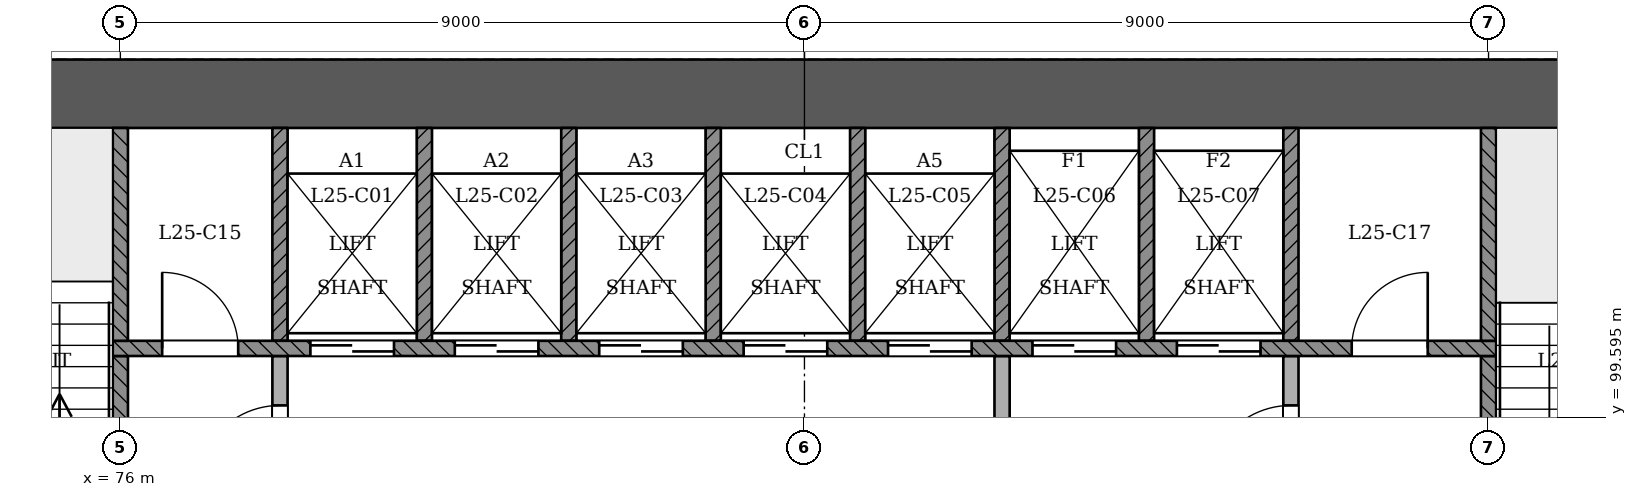
"""IFC4 building model, lengths in metres.
Left out: names, types, materials, properties, quantities, classifications, styles, units other than length and angle.
Written with IfcOpenShell. Run it as: python <this file> out.ifc"""

import sys

from ifc_helpers import new_model, si_unit, direction, frame, frame_2d, origin, place, context, subcontext, project, spatial, rectangle, extrude, element, fill, save


model = new_model("IFC4")
c1 = context("Model", 3, precision=1e-05, world=origin(), true_north=direction((0.0, 1.0)))
c2 = subcontext(c1, "Body", "Model", "MODEL_VIEW")
j1 = project(units=[si_unit("LENGTHUNIT", "METRE"), si_unit("PLANEANGLEUNIT", "RADIAN")], contexts=[c1])
p1 = place(None, origin())
s1 = spatial("IfcSite", under=j1, at=p1, CompositionType="ELEMENT")
p2 = place(p1, origin())
s2 = spatial("IfcBuilding", under=s1, at=p2, CompositionType="ELEMENT")
p3 = place(p2, frame((0.0, 0.0, 100.8)))
s3 = spatial("IfcBuildingStorey", under=s2, at=p3, CompositionType="ELEMENT", Elevation=100.8)
p4 = place(p3, frame((97.45, 103.85, 0.0), z_axis=(0.0, 0.0, 1.0), x_axis=(-1.0, 0.0, 0.0)))
e1 = element("IfcWall", 1, at=p4, inside=s3, PredefinedType="SHEAR", context=c2, shape_type="SweptSolid", body=[
    extrude(rectangle(XDim=25.35, YDim=0.9, at=frame_2d((12.675, 0.0))), origin(), (0.0, 0.0, 1.0), 3.6),
])
p5 = place(p3, frame((87.6, 93.4, 0.0), z_axis=(0.0, 0.0, 1.0), x_axis=(0.0, 1.0, 0.0)))
e2 = element("IfcWall", 2, at=p5, inside=s3, PredefinedType="PARTITIONING", context=c2, shape_type="SweptSolid", body=[
    extrude(rectangle(XDim=7.0, YDim=0.2, at=frame_2d((3.5, 0.0))), origin(), (0.0, 0.0, 1.0), 3.1),
])
p6 = place(p5, frame((4.45, 0.0, 0.0)))
e3 = element("IfcOpeningElement", 3, at=p6, cuts=e2, PredefinedType="OPENING", context=c2, shape_type="SweptSolid", body=[
    extrude(rectangle(XDim=1.1, YDim=2.1, at=frame_2d((0.55, 1.05))), frame((0.0, 0.11, 0.0), z_axis=(0.0, -1.0, 0.0), x_axis=(1.0, 0.0, 0.0)), (0.0, 0.0, 1.0), 0.221),
])
p7 = place(p3, frame((91.4, 96.2, 0.0), z_axis=(0.0, 0.0, 1.0), x_axis=(0.0, 1.0, 0.0)))
e4 = element("IfcWall", 4, at=p7, inside=s3, PredefinedType="PARTITIONING", context=c2, shape_type="SweptSolid", body=[
    extrude(rectangle(XDim=4.2, YDim=0.2, at=frame_2d((2.1, 0.0))), origin(), (0.0, 0.0, 1.0), 3.1),
])
p8 = place(p7, frame((2.45, 0.0, 0.0)))
e5 = element("IfcOpeningElement", 5, at=p8, cuts=e4, PredefinedType="OPENING", context=c2, shape_type="SweptSolid", body=[
    extrude(rectangle(XDim=1.1, YDim=2.1, at=frame_2d((0.55, 1.05))), frame((0.0, 0.11, 0.0), z_axis=(0.0, -1.0, 0.0), x_axis=(1.0, 0.0, 0.0)), (0.0, 0.0, 1.0), 0.221),
])
p9 = place(p3, frame((76.0, 96.7, 0.0), z_axis=(0.0, 0.0, 1.0), x_axis=(0.0, 1.0, 0.0)))
e6 = element("IfcWall", 6, at=p9, inside=s3, PredefinedType="SOLIDWALL", context=c2, shape_type="SweptSolid", body=[
    extrude(rectangle(XDim=3.7, YDim=0.2, at=frame_2d((1.85, 0.0))), origin(), (0.0, 0.0, 1.0), 3.1),
])
p10 = place(p9, frame((0.35, 0.0, 0.0)))
e7 = element("IfcOpeningElement", 7, at=p10, cuts=e6, PredefinedType="OPENING", context=c2, shape_type="SweptSolid", body=[
    extrude(rectangle(XDim=1.1, YDim=2.1, at=frame_2d((0.55, 1.05))), frame((0.0, 0.11, 0.0), z_axis=(0.0, -1.0, 0.0), x_axis=(1.0, 0.0, 0.0)), (0.0, 0.0, 1.0), 0.221),
])
p11 = place(p3, frame((78.1, 96.7, 0.0), z_axis=(0.0, 0.0, 1.0), x_axis=(0.0, 1.0, 0.0)))
e8 = element("IfcWall", 8, at=p11, inside=s3, PredefinedType="PARTITIONING", context=c2, shape_type="SweptSolid", body=[
    extrude(rectangle(XDim=3.7, YDim=0.2, at=frame_2d((1.85, 0.0))), origin(), (0.0, 0.0, 1.0), 3.1),
])
p12 = place(p11, frame((1.95, 0.0, 0.0)))
e9 = element("IfcOpeningElement", 9, at=p12, cuts=e8, PredefinedType="OPENING", context=c2, shape_type="SweptSolid", body=[
    extrude(rectangle(XDim=1.1, YDim=2.1, at=frame_2d((0.55, 1.05))), frame((0.0, 0.11, 0.0), z_axis=(0.0, -1.0, 0.0), x_axis=(1.0, 0.0, 0.0)), (0.0, 0.0, 1.0), 0.221),
])
p13 = place(p3, frame((94.0, 96.7, 0.0), z_axis=(0.0, 0.0, 1.0), x_axis=(0.0, 1.0, 0.0)))
e10 = element("IfcWall", 10, at=p13, inside=s3, PredefinedType="SOLIDWALL", context=c2, shape_type="SweptSolid", body=[
    extrude(rectangle(XDim=3.7, YDim=0.2, at=frame_2d((1.85, 0.0))), origin(), (0.0, 0.0, 1.0), 3.1),
])
p14 = place(p13, frame((0.35, 0.0, 0.0)))
e11 = element("IfcOpeningElement", 11, at=p14, cuts=e10, PredefinedType="OPENING", context=c2, shape_type="SweptSolid", body=[
    extrude(rectangle(XDim=1.1, YDim=2.1, at=frame_2d((0.55, 1.05))), frame((0.0, 0.11, 0.0), z_axis=(0.0, -1.0, 0.0), x_axis=(1.0, 0.0, 0.0)), (0.0, 0.0, 1.0), 0.221),
])
p15 = place(p3, frame((75.9, 100.5, 0.0), z_axis=(0.0, 0.0, 1.0), x_axis=(1.0, 0.0, 0.0)))
e12 = element("IfcWall", 12, at=p15, inside=s3, PredefinedType="SOLIDWALL", context=c2, shape_type="SweptSolid", body=[
    extrude(rectangle(XDim=18.2, YDim=0.2, at=frame_2d((9.1, 0.0))), origin(), (0.0, 0.0, 1.0), 3.1),
])
p16 = place(p15, frame((2.6, 0.0, 0.0)))
e13 = element("IfcOpeningElement", 13, at=p16, cuts=e12, PredefinedType="OPENING", context=c2, shape_type="SweptSolid", body=[
    extrude(rectangle(XDim=1.1, YDim=2.1, at=frame_2d((0.55, 1.05))), frame((0.0, 0.11, 0.0), z_axis=(0.0, -1.0, 0.0), x_axis=(1.0, 0.0, 0.0)), (0.0, 0.0, 1.0), 0.221),
])
p17 = place(p15, frame((4.5, 0.0, 0.0)))
e14 = element("IfcOpeningElement", 14, at=p17, cuts=e12, PredefinedType="OPENING", context=c2, shape_type="SweptSolid", body=[
    extrude(rectangle(XDim=1.1, YDim=2.1, at=frame_2d((0.55, 1.05))), frame((0.0, 0.11, 0.0), z_axis=(0.0, -1.0, 0.0), x_axis=(1.0, 0.0, 0.0)), (0.0, 0.0, 1.0), 0.221),
])
p18 = place(p15, frame((6.4, 0.0, 0.0)))
e15 = element("IfcOpeningElement", 15, at=p18, cuts=e12, PredefinedType="OPENING", context=c2, shape_type="SweptSolid", body=[
    extrude(rectangle(XDim=1.1, YDim=2.1, at=frame_2d((0.55, 1.05))), frame((0.0, 0.11, 0.0), z_axis=(0.0, -1.0, 0.0), x_axis=(1.0, 0.0, 0.0)), (0.0, 0.0, 1.0), 0.221),
])
p19 = place(p15, frame((8.3, 0.0, 0.0)))
e16 = element("IfcOpeningElement", 16, at=p19, cuts=e12, PredefinedType="OPENING", context=c2, shape_type="SweptSolid", body=[
    extrude(rectangle(XDim=1.1, YDim=2.1, at=frame_2d((0.55, 1.05))), frame((0.0, 0.11, 0.0), z_axis=(0.0, -1.0, 0.0), x_axis=(1.0, 0.0, 0.0)), (0.0, 0.0, 1.0), 0.221),
])
p20 = place(p15, frame((10.2, 0.0, 0.0)))
e17 = element("IfcOpeningElement", 17, at=p20, cuts=e12, PredefinedType="OPENING", context=c2, shape_type="SweptSolid", body=[
    extrude(rectangle(XDim=1.1, YDim=2.1, at=frame_2d((0.55, 1.05))), frame((0.0, 0.11, 0.0), z_axis=(0.0, -1.0, 0.0), x_axis=(1.0, 0.0, 0.0)), (0.0, 0.0, 1.0), 0.221),
])
p21 = place(p15, frame((12.1, 0.0, 0.0)))
e18 = element("IfcOpeningElement", 18, at=p21, cuts=e12, PredefinedType="OPENING", context=c2, shape_type="SweptSolid", body=[
    extrude(rectangle(XDim=1.1, YDim=2.1, at=frame_2d((0.55, 1.05))), frame((0.0, 0.11, 0.0), z_axis=(0.0, -1.0, 0.0), x_axis=(1.0, 0.0, 0.0)), (0.0, 0.0, 1.0), 0.221),
])
p22 = place(p15, frame((14.0, 0.0, 0.0)))
e19 = element("IfcOpeningElement", 19, at=p22, cuts=e12, PredefinedType="OPENING", context=c2, shape_type="SweptSolid", body=[
    extrude(rectangle(XDim=1.1, YDim=2.1, at=frame_2d((0.55, 1.05))), frame((0.0, 0.11, 0.0), z_axis=(0.0, -1.0, 0.0), x_axis=(1.0, 0.0, 0.0)), (0.0, 0.0, 1.0), 0.221),
])
p23 = place(p15, frame((0.65, 0.0, 0.0)))
e20 = element("IfcOpeningElement", 20, at=p23, cuts=e12, PredefinedType="OPENING", context=c2, shape_type="SweptSolid", body=[
    extrude(rectangle(XDim=1.0, YDim=2.1, at=frame_2d((0.5, 1.05))), frame((0.0, 0.11, 0.0), z_axis=(0.0, -1.0, 0.0), x_axis=(1.0, 0.0, 0.0)), (0.0, 0.0, 1.0), 0.221),
])
p24 = place(p15, frame((16.3, 0.0, 0.0)))
e21 = element("IfcOpeningElement", 21, at=p24, cuts=e12, PredefinedType="OPENING", context=c2, shape_type="SweptSolid", body=[
    extrude(rectangle(XDim=1.0, YDim=2.1, at=frame_2d((0.5, 1.05))), frame((0.0, 0.11, 0.0), z_axis=(0.0, -1.0, 0.0), x_axis=(1.0, 0.0, 0.0)), (0.0, 0.0, 1.0), 0.221),
])
for number, where, z_axis, x_axis in (
    (22, (76.0, 100.6, 0.0), (0.0, 0.0, 1.0), (0.0, 1.0, 0.0)),
    (23, (78.1, 100.6, 0.0), (0.0, 0.0, 1.0), (0.0, 1.0, 0.0)),
    (24, (80.0, 100.6, 0.0), (0.0, 0.0, 1.0), (0.0, 1.0, 0.0)),
    (25, (81.9, 100.6, 0.0), (0.0, 0.0, 1.0), (0.0, 1.0, 0.0)),
    (26, (83.8, 100.6, 0.0), (0.0, 0.0, 1.0), (0.0, 1.0, 0.0)),
    (27, (85.7, 100.6, 0.0), (0.0, 0.0, 1.0), (0.0, 1.0, 0.0)),
    (28, (87.6, 100.6, 0.0), (0.0, 0.0, 1.0), (0.0, 1.0, 0.0)),
    (29, (89.5, 100.6, 0.0), (0.0, 0.0, 1.0), (0.0, 1.0, 0.0)),
    (30, (91.4, 100.6, 0.0), (0.0, 0.0, 1.0), (0.0, 1.0, 0.0)),
    (31, (94.0, 100.6, 0.0), (0.0, 0.0, 1.0), (0.0, 1.0, 0.0)),
):
    element("IfcWall", number, at=place(p3, frame(where, z_axis=z_axis, x_axis=x_axis)), inside=s3, PredefinedType="SOLIDWALL", context=c2, shape_type="SweptSolid", body=[
        extrude(rectangle(XDim=2.8, YDim=0.2, at=frame_2d((1.4, 0.0))), origin(), (0.0, 0.0, 1.0), 3.1),
    ])
p25 = place(p16, origin())
e32 = element("IfcDoor", 32, at=p25, inside=s3, OperationType="SLIDING_TO_RIGHT", PredefinedType="NOTDEFINED", context=c2, shape_type="SweptSolid", body=[
    extrude(rectangle(XDim=1.1, YDim=2.1, at=frame_2d((0.55, 1.05))), frame((0.0, 0.025, 0.0), z_axis=(0.0, -1.0, 0.0), x_axis=(1.0, 0.0, 0.0)), (0.0, 0.0, 1.0), 0.05),
])
fill(e13, e32)
p26 = place(p17, origin())
e33 = element("IfcDoor", 33, at=p26, inside=s3, OperationType="SLIDING_TO_LEFT", PredefinedType="NOTDEFINED", context=c2, shape_type="SweptSolid", body=[
    extrude(rectangle(XDim=1.1, YDim=2.1, at=frame_2d((0.55, 1.05))), frame((0.0, 0.025, 0.0), z_axis=(0.0, -1.0, 0.0), x_axis=(1.0, 0.0, 0.0)), (0.0, 0.0, 1.0), 0.05),
])
fill(e14, e33)
p27 = place(p18, origin())
e34 = element("IfcDoor", 34, at=p27, inside=s3, OperationType="SLIDING_TO_RIGHT", PredefinedType="NOTDEFINED", context=c2, shape_type="SweptSolid", body=[
    extrude(rectangle(XDim=1.1, YDim=2.1, at=frame_2d((0.55, 1.05))), frame((0.0, 0.025, 0.0), z_axis=(0.0, -1.0, 0.0), x_axis=(1.0, 0.0, 0.0)), (0.0, 0.0, 1.0), 0.05),
])
fill(e15, e34)
p28 = place(p19, origin())
e35 = element("IfcDoor", 35, at=p28, inside=s3, OperationType="SLIDING_TO_LEFT", PredefinedType="NOTDEFINED", context=c2, shape_type="SweptSolid", body=[
    extrude(rectangle(XDim=1.1, YDim=2.1, at=frame_2d((0.55, 1.05))), frame((0.0, 0.025, 0.0), z_axis=(0.0, -1.0, 0.0), x_axis=(1.0, 0.0, 0.0)), (0.0, 0.0, 1.0), 0.05),
])
fill(e16, e35)
p29 = place(p20, origin())
e36 = element("IfcDoor", 36, at=p29, inside=s3, OperationType="SLIDING_TO_RIGHT", PredefinedType="NOTDEFINED", context=c2, shape_type="SweptSolid", body=[
    extrude(rectangle(XDim=1.1, YDim=2.1, at=frame_2d((0.55, 1.05))), frame((0.0, 0.025, 0.0), z_axis=(0.0, -1.0, 0.0), x_axis=(1.0, 0.0, 0.0)), (0.0, 0.0, 1.0), 0.05),
])
fill(e17, e36)
p30 = place(p21, origin())
e37 = element("IfcDoor", 37, at=p30, inside=s3, OperationType="SLIDING_TO_RIGHT", PredefinedType="NOTDEFINED", context=c2, shape_type="SweptSolid", body=[
    extrude(rectangle(XDim=1.1, YDim=2.1, at=frame_2d((0.55, 1.05))), frame((0.0, 0.025, 0.0), z_axis=(0.0, -1.0, 0.0), x_axis=(1.0, 0.0, 0.0)), (0.0, 0.0, 1.0), 0.05),
])
fill(e18, e37)
p31 = place(p22, origin())
e38 = element("IfcDoor", 38, at=p31, inside=s3, OperationType="SLIDING_TO_LEFT", PredefinedType="NOTDEFINED", context=c2, shape_type="SweptSolid", body=[
    extrude(rectangle(XDim=1.1, YDim=2.1, at=frame_2d((0.55, 1.05))), frame((0.0, 0.025, 0.0), z_axis=(0.0, -1.0, 0.0), x_axis=(1.0, 0.0, 0.0)), (0.0, 0.0, 1.0), 0.05),
])
fill(e19, e38)
p32 = place(p12, origin())
e39 = element("IfcDoor", 39, at=p32, inside=s3, OperationType="SINGLE_SWING_LEFT", PredefinedType="NOTDEFINED", context=c2, shape_type="SweptSolid", body=[
    extrude(rectangle(XDim=1.1, YDim=2.1, at=frame_2d((0.55, 1.05))), frame((0.0, 0.025, 0.0), z_axis=(0.0, -1.0, 0.0), x_axis=(1.0, 0.0, 0.0)), (0.0, 0.0, 1.0), 0.05),
])
fill(e9, e39)
p33 = place(p8, origin())
e40 = element("IfcDoor", 40, at=p33, inside=s3, OperationType="SINGLE_SWING_LEFT", PredefinedType="NOTDEFINED", context=c2, shape_type="SweptSolid", body=[
    extrude(rectangle(XDim=1.1, YDim=2.1, at=frame_2d((0.55, 1.05))), frame((0.0, 0.025, 0.0), z_axis=(0.0, -1.0, 0.0), x_axis=(1.0, 0.0, 0.0)), (0.0, 0.0, 1.0), 0.05),
])
fill(e5, e40)
p34 = place(p23, origin())
e41 = element("IfcDoor", 41, at=p34, inside=s3, OperationType="SINGLE_SWING_LEFT", PredefinedType="NOTDEFINED", context=c2, shape_type="SweptSolid", body=[
    extrude(rectangle(XDim=1.0, YDim=2.1, at=frame_2d((0.5, 1.05))), frame((0.0, 0.025, 0.0), z_axis=(0.0, -1.0, 0.0), x_axis=(1.0, 0.0, 0.0)), (0.0, 0.0, 1.0), 0.05),
])
fill(e20, e41)
p35 = place(p24, origin())
e42 = element("IfcDoor", 42, at=p35, inside=s3, OperationType="SINGLE_SWING_RIGHT", PredefinedType="NOTDEFINED", context=c2, shape_type="SweptSolid", body=[
    extrude(rectangle(XDim=1.0, YDim=2.1, at=frame_2d((0.5, 1.05))), frame((0.0, 0.025, 0.0), z_axis=(0.0, -1.0, 0.0), x_axis=(1.0, 0.0, 0.0)), (0.0, 0.0, 1.0), 0.05),
])
fill(e21, e42)
save(model, sys.argv[1])
